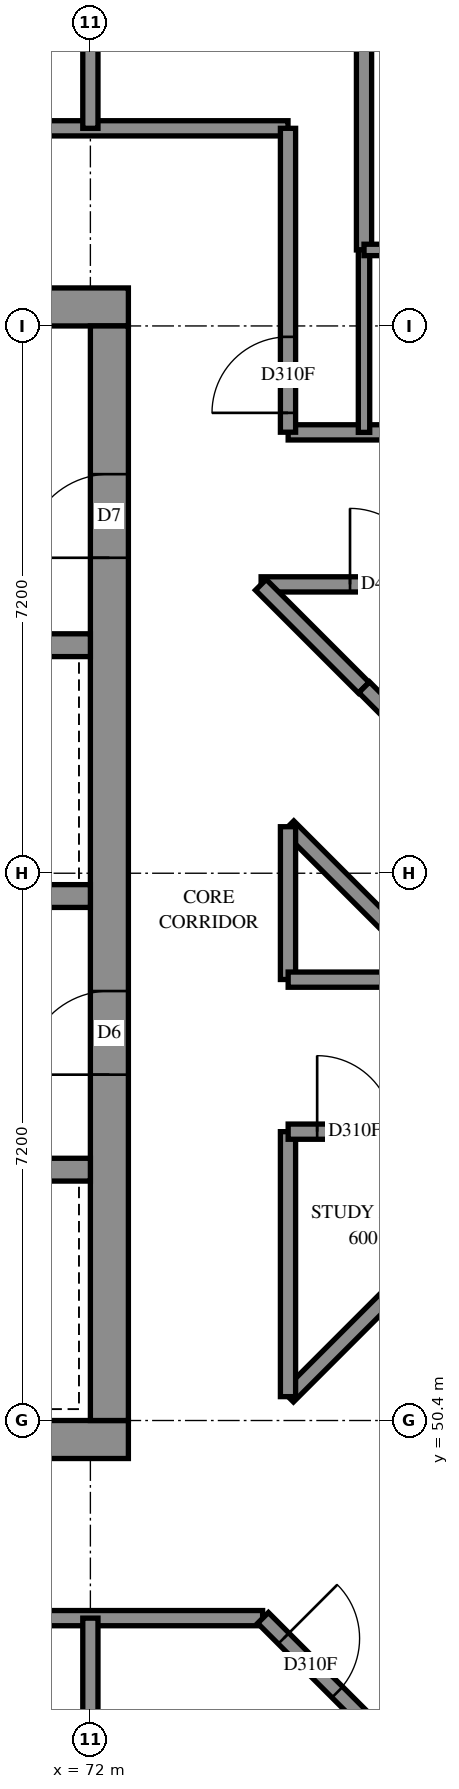
"""IFC4 building model, lengths in metres.
Left out: names, types, materials, properties, quantities, classifications, styles, units other than length and angle.
Written with IfcOpenShell. Run it as: python <this file> out.ifc"""

import sys

from ifc_helpers import new_model, si_unit, direction, frame, frame_2d, origin, place, context, subcontext, project, spatial, rectangle, extrude, element, fill, save


model = new_model("IFC4")
c1 = context("Model", 3, precision=1e-05, world=origin(), true_north=direction((0.0, 1.0)))
c2 = subcontext(c1, "Body", "Model", "MODEL_VIEW")
j1 = project(units=[si_unit("LENGTHUNIT", "METRE"), si_unit("PLANEANGLEUNIT", "RADIAN")], contexts=[c1])
p1 = place(None, origin())
s1 = spatial("IfcSite", under=j1, at=p1, CompositionType="ELEMENT")
p2 = place(p1, origin())
s2 = spatial("IfcBuilding", under=s1, at=p2, CompositionType="ELEMENT")
p3 = place(p2, frame((0.0, 0.0, 220.2)))
s3 = spatial("IfcBuildingStorey", under=s2, at=p3, CompositionType="ELEMENT", Elevation=220.2)
p4 = place(p3, frame((57.1, 50.15, -0.3), z_axis=(0.0, 0.0, 1.0), x_axis=(1.0, 0.0, 0.0)))
e1 = element("IfcWall", 1, at=p4, inside=s3, PredefinedType="SHEAR", context=c2, shape_type="SweptSolid", body=[
    extrude(rectangle(XDim=15.4, YDim=0.5, at=frame_2d((7.7, 0.0))), origin(), (0.0, 0.0, 1.0), 2.7),
])
p5 = place(p3, frame((57.1, 65.05, -0.3), z_axis=(0.0, 0.0, 1.0), x_axis=(1.0, 0.0, 0.0)))
e2 = element("IfcWall", 2, at=p5, inside=s3, PredefinedType="SHEAR", context=c2, shape_type="SweptSolid", body=[
    extrude(rectangle(XDim=15.4, YDim=0.5, at=frame_2d((7.7, 0.0))), origin(), (0.0, 0.0, 1.0), 2.7),
])
p6 = place(p5, frame((10.5, 0.0, 0.3)))
e3 = element("IfcOpeningElement", 3, at=p6, cuts=e2, PredefinedType="OPENING", context=c2, shape_type="SweptSolid", body=[
    extrude(rectangle(XDim=0.8, YDim=2.1, at=frame_2d((0.4, 1.05))), frame((0.0, 0.26, 0.0), z_axis=(0.0, -1.0, 0.0), x_axis=(1.0, 0.0, 0.0)), (0.0, 0.0, 1.0), 0.52),
])
p7 = place(p3, frame((72.25, 50.4, -0.3), z_axis=(0.0, 0.0, 1.0), x_axis=(0.0, 1.0, 0.0)))
e4 = element("IfcWall", 4, at=p7, inside=s3, PredefinedType="SHEAR", context=c2, shape_type="SweptSolid", body=[
    extrude(rectangle(XDim=14.4, YDim=0.5, at=frame_2d((7.2, 0.0))), origin(), (0.0, 0.0, 1.0), 2.7),
])
p8 = place(p7, frame((4.55, 0.0, 0.3)))
e5 = element("IfcOpeningElement", 5, at=p8, cuts=e4, PredefinedType="OPENING", context=c2, shape_type="SweptSolid", body=[
    extrude(rectangle(XDim=1.1, YDim=2.1, at=frame_2d((0.55, 1.05))), frame((0.0, 0.26, 0.0), z_axis=(0.0, -1.0, 0.0), x_axis=(1.0, 0.0, 0.0)), (0.0, 0.0, 1.0), 0.52),
])
p9 = place(p7, frame((11.35, 0.0, 0.3)))
e6 = element("IfcOpeningElement", 6, at=p9, cuts=e4, PredefinedType="OPENING", context=c2, shape_type="SweptSolid", body=[
    extrude(rectangle(XDim=1.1, YDim=2.1, at=frame_2d((0.55, 1.05))), frame((0.0, 0.26, 0.0), z_axis=(0.0, -1.0, 0.0), x_axis=(1.0, 0.0, 0.0)), (0.0, 0.0, 1.0), 0.52),
])
p10 = place(p3, frame((57.6, 53.7, 0.0), z_axis=(0.0, 0.0, 1.0), x_axis=(1.0, 0.0, 0.0)))
e7 = element("IfcWall", 7, at=p10, inside=s3, PredefinedType="SOLIDWALL", context=c2, shape_type="SweptSolid", body=[
    extrude(rectangle(XDim=14.4, YDim=0.3, at=frame_2d((7.2, 0.0))), origin(), (0.0, 0.0, 1.0), 3.1),
])
p11 = place(p10, frame((1.35, 0.0, 0.0)))
e8 = element("IfcOpeningElement", 8, at=p11, cuts=e7, PredefinedType="OPENING", context=c2, shape_type="SweptSolid", body=[
    extrude(rectangle(XDim=0.9, YDim=2.1, at=frame_2d((0.45, 1.05))), frame((0.0, 0.16, 0.0), z_axis=(0.0, -1.0, 0.0), x_axis=(1.0, 0.0, 0.0)), (0.0, 0.0, 1.0), 0.32),
])
p12 = place(p10, frame((4.95, 0.0, 0.0)))
e9 = element("IfcOpeningElement", 9, at=p12, cuts=e7, PredefinedType="OPENING", context=c2, shape_type="SweptSolid", body=[
    extrude(rectangle(XDim=0.9, YDim=2.1, at=frame_2d((0.45, 1.05))), frame((0.0, 0.16, 0.0), z_axis=(0.0, -1.0, 0.0), x_axis=(1.0, 0.0, 0.0)), (0.0, 0.0, 1.0), 0.32),
])
p13 = place(p10, frame((8.55, 0.0, 0.0)))
e10 = element("IfcOpeningElement", 10, at=p13, cuts=e7, PredefinedType="OPENING", context=c2, shape_type="SweptSolid", body=[
    extrude(rectangle(XDim=0.9, YDim=2.1, at=frame_2d((0.45, 1.05))), frame((0.0, 0.16, 0.0), z_axis=(0.0, -1.0, 0.0), x_axis=(1.0, 0.0, 0.0)), (0.0, 0.0, 1.0), 0.32),
])
p14 = place(p10, frame((12.05, 0.0, 0.0)))
e11 = element("IfcOpeningElement", 11, at=p14, cuts=e7, PredefinedType="OPENING", context=c2, shape_type="SweptSolid", body=[
    extrude(rectangle(XDim=1.1, YDim=2.1, at=frame_2d((0.55, 1.05))), frame((0.0, 0.16, 0.0), z_axis=(0.0, -1.0, 0.0), x_axis=(1.0, 0.0, 0.0)), (0.0, 0.0, 1.0), 0.32),
])
p15 = place(p3, frame((57.6, 57.3, 0.0), z_axis=(0.0, 0.0, 1.0), x_axis=(1.0, 0.0, 0.0)))
e12 = element("IfcWall", 12, at=p15, inside=s3, PredefinedType="SOLIDWALL", context=c2, shape_type="SweptSolid", body=[
    extrude(rectangle(XDim=14.4, YDim=0.3, at=frame_2d((7.2, 0.0))), origin(), (0.0, 0.0, 1.0), 3.1),
])
p16 = place(p15, frame((1.25, 0.0, 0.0)))
e13 = element("IfcOpeningElement", 13, at=p16, cuts=e12, PredefinedType="OPENING", context=c2, shape_type="SweptSolid", body=[
    extrude(rectangle(XDim=1.1, YDim=2.1, at=frame_2d((0.55, 1.05))), frame((0.0, 0.16, 0.0), z_axis=(0.0, -1.0, 0.0), x_axis=(1.0, 0.0, 0.0)), (0.0, 0.0, 1.0), 0.32),
])
p17 = place(p15, frame((4.85, 0.0, 0.0)))
e14 = element("IfcOpeningElement", 14, at=p17, cuts=e12, PredefinedType="OPENING", context=c2, shape_type="SweptSolid", body=[
    extrude(rectangle(XDim=1.1, YDim=2.1, at=frame_2d((0.55, 1.05))), frame((0.0, 0.16, 0.0), z_axis=(0.0, -1.0, 0.0), x_axis=(1.0, 0.0, 0.0)), (0.0, 0.0, 1.0), 0.32),
])
p18 = place(p15, frame((8.45, 0.0, 0.0)))
e15 = element("IfcOpeningElement", 15, at=p18, cuts=e12, PredefinedType="OPENING", context=c2, shape_type="SweptSolid", body=[
    extrude(rectangle(XDim=1.1, YDim=2.1, at=frame_2d((0.55, 1.05))), frame((0.0, 0.16, 0.0), z_axis=(0.0, -1.0, 0.0), x_axis=(1.0, 0.0, 0.0)), (0.0, 0.0, 1.0), 0.32),
])
p19 = place(p15, frame((12.05, 0.0, 0.0)))
e16 = element("IfcOpeningElement", 16, at=p19, cuts=e12, PredefinedType="OPENING", context=c2, shape_type="SweptSolid", body=[
    extrude(rectangle(XDim=1.1, YDim=2.1, at=frame_2d((0.55, 1.05))), frame((0.0, 0.16, 0.0), z_axis=(0.0, -1.0, 0.0), x_axis=(1.0, 0.0, 0.0)), (0.0, 0.0, 1.0), 0.32),
])
p20 = place(p3, frame((64.8, 60.6, 0.0), z_axis=(0.0, 0.0, 1.0), x_axis=(1.0, 0.0, 0.0)))
e17 = element("IfcWall", 17, at=p20, inside=s3, PredefinedType="SOLIDWALL", context=c2, shape_type="SweptSolid", body=[
    extrude(rectangle(XDim=7.2, YDim=0.3, at=frame_2d((3.6, 0.0))), origin(), (0.0, 0.0, 1.0), 3.1),
])
p21 = place(p3, frame((55.0, 67.4, 0.0), z_axis=(0.0, 0.0, 1.0), x_axis=(1.0, 0.0, 0.0)))
e18 = element("IfcWall", 18, at=p21, inside=s3, PredefinedType="PARTITIONING", context=c2, shape_type="SweptSolid", body=[
    extrude(rectangle(XDim=19.6, YDim=0.2, at=frame_2d((9.8, 0.0))), origin(), (0.0, 0.0, 1.0), 3.1),
])
p22 = place(p21, frame((4.9, 0.0, 0.0)))
e19 = element("IfcOpeningElement", 19, at=p22, cuts=e18, PredefinedType="OPENING", context=c2, shape_type="SweptSolid", body=[
    extrude(rectangle(XDim=0.9, YDim=2.1, at=frame_2d((0.45, 1.05))), frame((0.0, 0.11, 0.0), z_axis=(0.0, -1.0, 0.0), x_axis=(1.0, 0.0, 0.0)), (0.0, 0.0, 1.0), 0.22),
])
p23 = place(p21, frame((6.6, 0.0, 0.0)))
e20 = element("IfcOpeningElement", 20, at=p23, cuts=e18, PredefinedType="OPENING", context=c2, shape_type="SweptSolid", body=[
    extrude(rectangle(XDim=0.9, YDim=2.1, at=frame_2d((0.45, 1.05))), frame((0.0, 0.11, 0.0), z_axis=(0.0, -1.0, 0.0), x_axis=(1.0, 0.0, 0.0)), (0.0, 0.0, 1.0), 0.22),
])
p24 = place(p21, frame((14.001, 0.0, 0.0)))
e21 = element("IfcOpeningElement", 21, at=p24, cuts=e18, PredefinedType="OPENING", context=c2, shape_type="SweptSolid", body=[
    extrude(rectangle(XDim=0.9, YDim=2.1, at=frame_2d((0.45, 1.05))), frame((0.0, 0.11, 0.0), z_axis=(0.0, -1.0, 0.0), x_axis=(1.0, 0.0, 0.0)), (0.0, 0.0, 1.0), 0.22),
])
p25 = place(p3, frame((55.0, 47.8, 0.0), z_axis=(0.0, 0.0, 1.0), x_axis=(1.0, 0.0, 0.0)))
e22 = element("IfcWall", 22, at=p25, inside=s3, PredefinedType="PARTITIONING", context=c2, shape_type="SweptSolid", body=[
    extrude(rectangle(XDim=19.266, YDim=0.2, at=frame_2d((9.633, 0.0))), origin(), (0.0, 0.0, 1.0), 3.1),
])
p26 = place(p25, frame((4.9, 0.0, 0.0)))
e23 = element("IfcOpeningElement", 23, at=p26, cuts=e22, PredefinedType="OPENING", context=c2, shape_type="SweptSolid", body=[
    extrude(rectangle(XDim=0.9, YDim=2.1, at=frame_2d((0.45, 1.05))), frame((0.0, 0.11, 0.0), z_axis=(0.0, -1.0, 0.0), x_axis=(1.0, 0.0, 0.0)), (0.0, 0.0, 1.0), 0.22),
])
p27 = place(p25, frame((6.6, 0.0, 0.0)))
e24 = element("IfcOpeningElement", 24, at=p27, cuts=e22, PredefinedType="OPENING", context=c2, shape_type="SweptSolid", body=[
    extrude(rectangle(XDim=0.9, YDim=2.1, at=frame_2d((0.45, 1.05))), frame((0.0, 0.11, 0.0), z_axis=(0.0, -1.0, 0.0), x_axis=(1.0, 0.0, 0.0)), (0.0, 0.0, 1.0), 0.22),
])
p28 = place(p25, frame((13.661, 0.0, 0.0)))
e25 = element("IfcOpeningElement", 25, at=p28, cuts=e22, PredefinedType="OPENING", context=c2, shape_type="SweptSolid", body=[
    extrude(rectangle(XDim=0.9, YDim=2.1, at=frame_2d((0.45, 1.05))), frame((0.0, 0.11, 0.0), z_axis=(0.0, -1.0, 0.0), x_axis=(1.0, 0.0, 0.0)), (0.0, 0.0, 1.0), 0.22),
])
p29 = place(p3, frame((75.6, 65.8, 0.0), z_axis=(0.0, 0.0, 1.0), x_axis=(0.0, 1.0, 0.0)))
e26 = element("IfcWall", 26, at=p29, inside=s3, PredefinedType="PARTITIONING", context=c2, shape_type="SweptSolid", body=[
    extrude(rectangle(XDim=7.005, YDim=0.2, at=frame_2d((3.503, 0.0))), origin(), (0.0, 0.0, 1.0), 3.1),
])
p30 = place(p3, frame((74.246, 61.4, 0.0), z_axis=(0.0, 0.0, 1.0), x_axis=(1.0, 0.0, 0.0)))
e27 = element("IfcWall", 27, at=p30, inside=s3, PredefinedType="PARTITIONING", context=c2, shape_type="SweptSolid", body=[
    extrude(rectangle(XDim=4.954, YDim=0.2, at=frame_2d((2.477, 0.0))), origin(), (0.0, 0.0, 1.0), 3.1),
])
p31 = place(p30, frame((1.17, 0.0, 0.0)))
e28 = element("IfcOpeningElement", 28, at=p31, cuts=e27, PredefinedType="OPENING", context=c2, shape_type="SweptSolid", body=[
    extrude(rectangle(XDim=1.0, YDim=2.1, at=frame_2d((0.5, 1.05))), frame((0.0, 0.11, 0.0), z_axis=(0.0, -1.0, 0.0), x_axis=(1.0, 0.0, 0.0)), (0.0, 0.0, 1.0), 0.22),
])
p32 = place(p3, frame((74.601, 50.715, 0.0), z_axis=(0.0, 0.0, 1.0), x_axis=(0.7071067812, 0.7071067812, 0.0)))
e29 = element("IfcWall", 29, at=p32, inside=s3, PredefinedType="PARTITIONING", context=c2, shape_type="SweptSolid", body=[
    extrude(rectangle(XDim=4.927, YDim=0.2, at=frame_2d((2.464, 0.0))), origin(), (0.0, 0.0, 1.0), 3.1),
])
p33 = place(p3, frame((74.272, 47.803, 0.0), z_axis=(0.0, 0.0, 1.0), x_axis=(0.7071067812, -0.7071067812, 0.0)))
e30 = element("IfcWall", 30, at=p33, inside=s3, PredefinedType="PARTITIONING", context=c2, shape_type="SweptSolid", body=[
    extrude(rectangle(XDim=4.641, YDim=0.2, at=frame_2d((2.321, 0.0))), origin(), (0.0, 0.0, 1.0), 3.1),
])
p34 = place(p33, frame((0.382, 0.0, 0.0)))
e31 = element("IfcOpeningElement", 31, at=p34, cuts=e30, PredefinedType="OPENING", context=c2, shape_type="SweptSolid", body=[
    extrude(rectangle(XDim=1.0, YDim=2.1, at=frame_2d((0.5, 1.05))), frame((0.0, 0.11, 0.0), z_axis=(0.0, -1.0, 0.0), x_axis=(1.0, 0.0, 0.0)), (0.0, 0.0, 1.0), 0.22),
])
p35 = place(p3, frame((74.602, 63.4, 0.0), z_axis=(0.0, 0.0, 1.0), x_axis=(1.0, 0.0, 0.0)))
e32 = element("IfcWall", 32, at=p35, inside=s3, PredefinedType="PARTITIONING", context=c2, shape_type="SweptSolid", body=[
    extrude(rectangle(XDim=4.598, YDim=0.2, at=frame_2d((2.299, 0.0))), origin(), (0.0, 0.0, 1.0), 3.1),
])
p36 = place(p35, frame((3.298, 0.0, 0.0)))
e33 = element("IfcOpeningElement", 33, at=p36, cuts=e32, PredefinedType="OPENING", context=c2, shape_type="SweptSolid", body=[
    extrude(rectangle(XDim=0.9, YDim=2.1, at=frame_2d((0.45, 1.05))), frame((0.0, 0.11, 0.0), z_axis=(0.0, -1.0, 0.0), x_axis=(1.0, 0.0, 0.0)), (0.0, 0.0, 1.0), 0.22),
])
p37 = place(p3, frame((72.0, 43.6, 0.0), z_axis=(0.0, 0.0, 1.0), x_axis=(0.0, 1.0, 0.0)))
e34 = element("IfcWall", 34, at=p37, inside=s3, PredefinedType="PARTITIONING", context=c2, shape_type="SweptSolid", body=[
    extrude(rectangle(XDim=4.2, YDim=0.2, at=frame_2d((2.1, 0.0))), origin(), (0.0, 0.0, 1.0), 3.1),
])
p38 = place(p3, frame((72.0, 67.4, 0.0), z_axis=(0.0, 0.0, 1.0), x_axis=(0.0, 1.0, 0.0)))
e35 = element("IfcWall", 35, at=p38, inside=s3, PredefinedType="PARTITIONING", context=c2, shape_type="SweptSolid", body=[
    extrude(rectangle(XDim=4.096, YDim=0.2, at=frame_2d((2.048, 0.0))), origin(), (0.0, 0.0, 1.0), 3.1),
])
p39 = place(p3, frame((74.6, 63.402, 0.0), z_axis=(0.0, 0.0, 1.0), x_axis=(0.0, 1.0, 0.0)))
e36 = element("IfcWall", 36, at=p39, inside=s3, PredefinedType="PARTITIONING", context=c2, shape_type="SweptSolid", body=[
    extrude(rectangle(XDim=3.998, YDim=0.2, at=frame_2d((1.999, 0.0))), origin(), (0.0, 0.0, 1.0), 3.1),
])
p40 = place(p39, frame((0.255, 0.0, 0.0)))
e37 = element("IfcOpeningElement", 37, at=p40, cuts=e36, PredefinedType="OPENING", context=c2, shape_type="SweptSolid", body=[
    extrude(rectangle(XDim=1.0, YDim=2.1, at=frame_2d((0.5, 1.05))), frame((0.0, 0.11, 0.0), z_axis=(0.0, -1.0, 0.0), x_axis=(1.0, 0.0, 0.0)), (0.0, 0.0, 1.0), 0.22),
])
p41 = place(p3, frame((74.6, 50.714, 0.0), z_axis=(0.0, 0.0, 1.0), x_axis=(0.0, 1.0, 0.0)))
e38 = element("IfcWall", 38, at=p41, inside=s3, PredefinedType="PARTITIONING", context=c2, shape_type="SweptSolid", body=[
    extrude(rectangle(XDim=3.486, YDim=0.2, at=frame_2d((1.743, 0.0))), origin(), (0.0, 0.0, 1.0), 3.1),
])
p42 = place(p3, frame((74.602, 54.2, 0.0), z_axis=(0.0, 0.0, 1.0), x_axis=(1.0, 0.0, 0.0)))
e39 = element("IfcWall", 39, at=p42, inside=s3, PredefinedType="PARTITIONING", context=c2, shape_type="SweptSolid", body=[
    extrude(rectangle(XDim=3.484, YDim=0.2, at=frame_2d((1.742, 0.0))), origin(), (0.0, 0.0, 1.0), 3.1),
])
p43 = place(p42, frame((0.382, 0.0, 0.0)))
e40 = element("IfcOpeningElement", 40, at=p43, cuts=e39, PredefinedType="OPENING", context=c2, shape_type="SweptSolid", body=[
    extrude(rectangle(XDim=1.0, YDim=2.1, at=frame_2d((0.5, 1.05))), frame((0.0, 0.11, 0.0), z_axis=(0.0, -1.0, 0.0), x_axis=(1.0, 0.0, 0.0)), (0.0, 0.0, 1.0), 0.22),
])
p44 = place(p3, frame((74.606, 58.218, 0.0), z_axis=(0.0, 0.0, 1.0), x_axis=(0.7071067812, -0.7071067812, 0.0)))
e41 = element("IfcWall", 41, at=p44, inside=s3, PredefinedType="PARTITIONING", context=c2, shape_type="SweptSolid", body=[
    extrude(rectangle(XDim=2.845, YDim=0.2, at=frame_2d((1.423, 0.0))), origin(), (0.0, 0.0, 1.0), 3.1),
])
p45 = place(p3, frame((75.6, 63.4, 0.0), z_axis=(0.0, 0.0, 1.0), x_axis=(0.0, 1.0, 0.0)))
e42 = element("IfcWall", 42, at=p45, inside=s3, PredefinedType="PARTITIONING", context=c2, shape_type="SweptSolid", body=[
    extrude(rectangle(XDim=2.4, YDim=0.15, at=frame_2d((1.2, 0.0))), origin(), (0.0, 0.0, 1.0), 3.1),
])
for number, where, z_axis, x_axis in (
    (43, (74.6, 56.202, 0.0), (0.0, 0.0, 1.0), (0.0, 1.0, 0.0)),
    (44, (74.602, 56.2, 0.0), (0.0, 0.0, 1.0), (1.0, 0.0, 0.0)),
):
    element("IfcWall", number, at=place(p3, frame(where, z_axis=z_axis, x_axis=x_axis)), inside=s3, PredefinedType="PARTITIONING", context=c2, shape_type="SweptSolid", body=[
        extrude(rectangle(XDim=2.01, YDim=0.2, at=frame_2d((1.005, 0.0))), origin(), (0.0, 0.0, 1.0), 3.1),
    ])
p46 = place(p3, frame((74.243, 61.395, 0.0), z_axis=(0.0, 0.0, 1.0), x_axis=(0.7071067812, -0.7071067812, 0.0)))
e45 = element("IfcWall", 45, at=p46, inside=s3, PredefinedType="PARTITIONING", context=c2, shape_type="SweptSolid", body=[
    extrude(rectangle(XDim=1.915, YDim=0.2, at=frame_2d((0.957, 0.0))), origin(), (0.0, 0.0, 1.0), 3.1),
])
p47 = place(p3, frame((75.6, 65.8, 0.0), z_axis=(0.0, 0.0, 1.0), x_axis=(1.0, 0.0, 0.0)))
e46 = element("IfcWall", 46, at=p47, inside=s3, PredefinedType="PARTITIONING", context=c2, shape_type="SweptSolid", body=[
    extrude(rectangle(XDim=1.9, YDim=0.15, at=frame_2d((0.95, 0.0))), origin(), (0.0, 0.0, 1.0), 3.1),
])
p48 = place(p47, frame((0.607, 0.0, 0.0)))
e47 = element("IfcOpeningElement", 47, at=p48, cuts=e46, PredefinedType="OPENING", context=c2, shape_type="SweptSolid", body=[
    extrude(rectangle(XDim=0.8, YDim=2.1, at=frame_2d((0.4, 1.05))), frame((0.0, 0.085, 0.0), z_axis=(0.0, -1.0, 0.0), x_axis=(1.0, 0.0, 0.0)), (0.0, 0.0, 1.0), 0.17),
])
p49 = place(p3, frame((75.602, 60.046, 0.0), z_axis=(0.0, 0.0, 1.0), x_axis=(0.7063318703, -0.7078808437, 0.0)))
e48 = element("IfcWall", 48, at=p49, inside=s3, PredefinedType="PARTITIONING", context=c2, shape_type="SweptSolid", body=[
    extrude(rectangle(XDim=1.291, YDim=0.2, at=frame_2d((0.646, 0.0))), origin(), (0.0, 0.0, 1.0), 3.1),
])
p50 = place(p8, origin())
e49 = element("IfcDoor", 49, at=p50, inside=s3, OperationType="DOUBLE_DOOR_SINGLE_SWING", PredefinedType="DOOR", context=c2, shape_type="SweptSolid", body=[
    extrude(rectangle(XDim=1.1, YDim=2.1, at=frame_2d((0.55, 1.05))), frame((0.0, 0.025, 0.0), z_axis=(0.0, -1.0, 0.0), x_axis=(1.0, 0.0, 0.0)), (0.0, 0.0, 1.0), 0.05),
])
fill(e5, e49)
p51 = place(p9, origin())
e50 = element("IfcDoor", 50, at=p51, inside=s3, OperationType="SINGLE_SWING_RIGHT", PredefinedType="DOOR", context=c2, shape_type="SweptSolid", body=[
    extrude(rectangle(XDim=1.1, YDim=2.1, at=frame_2d((0.55, 1.05))), frame((0.0, 0.025, 0.0), z_axis=(0.0, -1.0, 0.0), x_axis=(1.0, 0.0, 0.0)), (0.0, 0.0, 1.0), 0.05),
])
fill(e6, e50)
p52 = place(p43, origin())
e51 = element("IfcDoor", 51, at=p52, inside=s3, OperationType="SINGLE_SWING_RIGHT", PredefinedType="DOOR", context=c2, shape_type="SweptSolid", body=[
    extrude(rectangle(XDim=1.0, YDim=2.1, at=frame_2d((0.5, 1.05))), frame((0.0, 0.025, 0.0), z_axis=(0.0, -1.0, 0.0), x_axis=(1.0, 0.0, 0.0)), (0.0, 0.0, 1.0), 0.05),
])
fill(e40, e51)
p53 = place(p40, origin())
e52 = element("IfcDoor", 52, at=p53, inside=s3, OperationType="SINGLE_SWING_RIGHT", PredefinedType="DOOR", context=c2, shape_type="SweptSolid", body=[
    extrude(rectangle(XDim=1.0, YDim=2.1, at=frame_2d((0.5, 1.05))), frame((0.0, 0.025, 0.0), z_axis=(0.0, -1.0, 0.0), x_axis=(1.0, 0.0, 0.0)), (0.0, 0.0, 1.0), 0.05),
])
fill(e37, e52)
p54 = place(p34, origin())
e53 = element("IfcDoor", 53, at=p54, inside=s3, OperationType="SINGLE_SWING_LEFT", PredefinedType="DOOR", context=c2, shape_type="SweptSolid", body=[
    extrude(rectangle(XDim=1.0, YDim=2.1, at=frame_2d((0.5, 1.05))), frame((0.0, 0.025, 0.0), z_axis=(0.0, -1.0, 0.0), x_axis=(1.0, 0.0, 0.0)), (0.0, 0.0, 1.0), 0.05),
])
fill(e31, e53)
p55 = place(p31, origin())
e54 = element("IfcDoor", 54, at=p55, inside=s3, OperationType="SINGLE_SWING_RIGHT", PredefinedType="DOOR", context=c2, shape_type="SweptSolid", body=[
    extrude(rectangle(XDim=1.0, YDim=2.1, at=frame_2d((0.5, 1.05))), frame((0.0, 0.025, 0.0), z_axis=(0.0, -1.0, 0.0), x_axis=(1.0, 0.0, 0.0)), (0.0, 0.0, 1.0), 0.05),
])
fill(e28, e54)
save(model, sys.argv[1])
